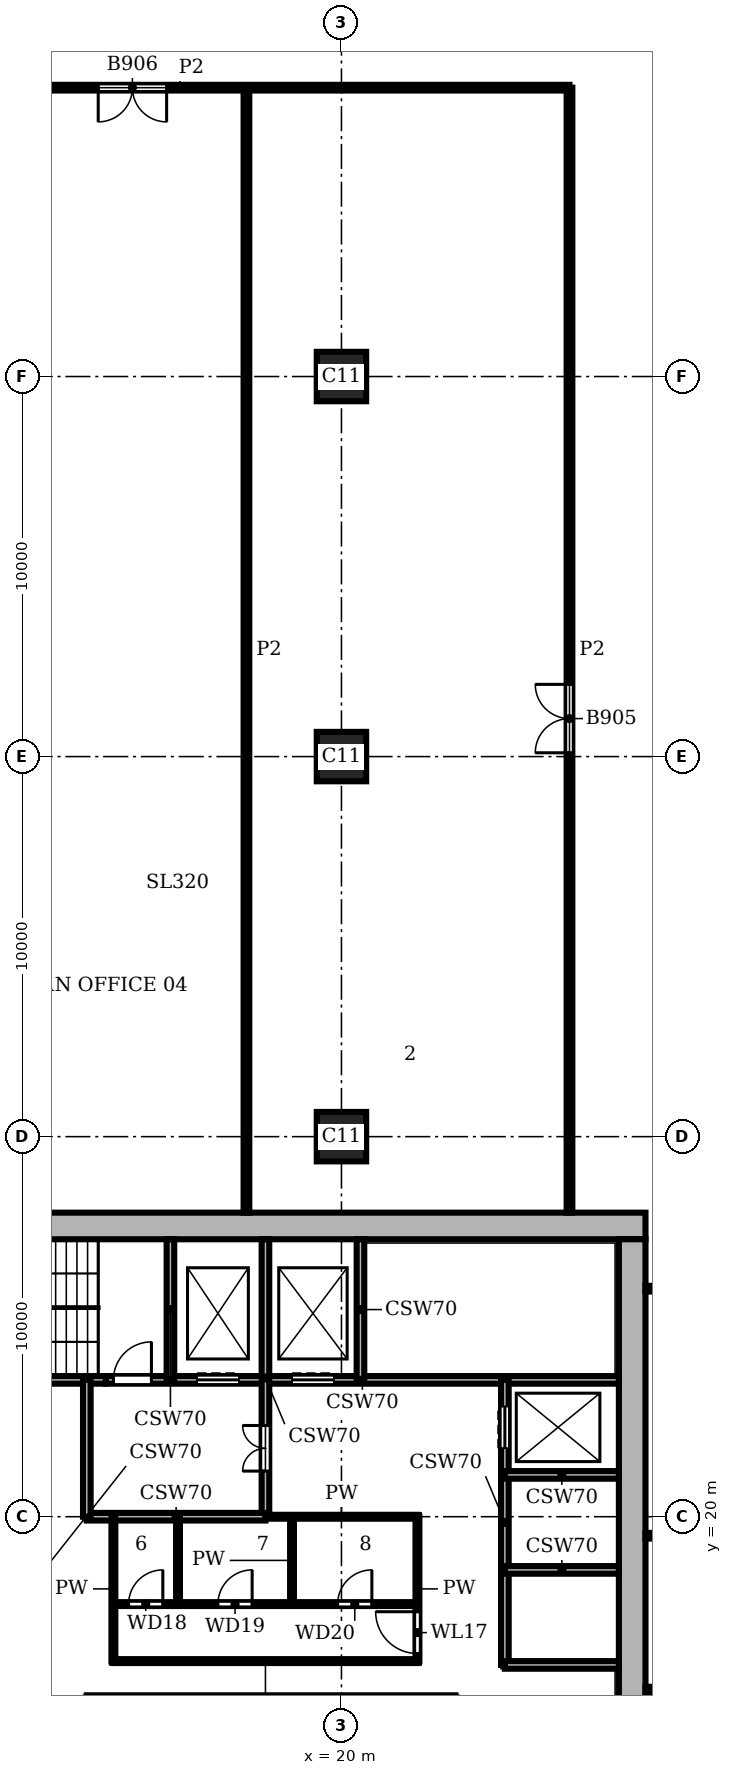
"""IFC4 building model, lengths in metres.
Left out: names, types, materials, properties, quantities, classifications, styles, units other than length and angle.
Written with IfcOpenShell. Run it as: python <this file> out.ifc"""

import sys

from ifc_helpers import new_model, si_unit, direction, frame, frame_2d, origin, origin_2d, place, context, subcontext, project, spatial, rectangle, extrude, element, fill, save


model = new_model("IFC4")
c1 = context("Model", 3, precision=1e-05, world=origin(), true_north=direction((0.0, 1.0)))
c2 = subcontext(c1, "Body", "Model", "MODEL_VIEW")
j1 = project(units=[si_unit("LENGTHUNIT", "METRE"), si_unit("PLANEANGLEUNIT", "RADIAN")], contexts=[c1])
p1 = place(None, origin())
s1 = spatial("IfcSite", under=j1, at=p1, CompositionType="ELEMENT")
p2 = place(p1, origin())
s2 = spatial("IfcBuilding", under=s1, at=p2, CompositionType="ELEMENT")
p3 = place(p2, frame((0.0, 0.0, 225.3)))
s3 = spatial("IfcBuildingStorey", under=s2, at=p3, CompositionType="ELEMENT", Elevation=225.3)
for number, where, z_axis, x_axis in (
    (1, (20.0, 30.0, 0.0), (0.0, 0.0, 1.0), (1.0, 0.0, 0.0)),
    (2, (20.0, 40.0, 0.0), (0.0, 0.0, 1.0), (1.0, 0.0, 0.0)),
    (3, (20.0, 50.0, 0.0), (0.0, 0.0, 1.0), (1.0, 0.0, 0.0)),
):
    element("IfcColumn", number, at=place(p3, frame(where, z_axis=z_axis, x_axis=x_axis)), inside=s3, PredefinedType="COLUMN", context=c2, shape_type="SweptSolid", body=[
        extrude(rectangle(XDim=1.3, YDim=1.3, at=origin_2d()), origin(), (0.0, 0.0, 1.0), 3.9),
    ])
p4 = place(p3, frame((27.65, 8.7, 0.0), z_axis=(0.0, 0.0, 1.0), x_axis=(0.0, 1.0, 0.0)))
e4 = element("IfcWall", 4, at=p4, inside=s3, PredefinedType="SHEAR", context=c2, shape_type="SweptSolid", body=[
    extrude(rectangle(XDim=18.6, YDim=0.7, at=frame_2d((9.3, 0.0))), origin(), (0.0, 0.0, 1.0), 3.9),
])
p5 = place(p4, frame((4.75, 0.0, 0.0)))
e5 = element("IfcOpeningElement", 5, at=p5, cuts=e4, PredefinedType="OPENING", context=c2, shape_type="SweptSolid", body=[
    extrude(rectangle(XDim=1.6, YDim=2.1, at=frame_2d((0.8, 1.05))), frame((0.0, 0.36, 0.0), z_axis=(0.0, -1.0, 0.0), x_axis=(1.0, 0.0, 0.0)), (0.0, 0.0, 1.0), 0.72),
])
p6 = place(p3, frame((28.0, 27.65, 0.0), z_axis=(0.0, 0.0, 1.0), x_axis=(-1.0, 0.0, 0.0)))
e6 = element("IfcWall", 6, at=p6, inside=s3, PredefinedType="SHEAR", context=c2, shape_type="SweptSolid", body=[
    extrude(rectangle(XDim=20.0, YDim=0.7, at=frame_2d((10.0, 0.0))), origin(), (0.0, 0.0, 1.0), 3.9),
])
p7 = place(p3, frame((24.3, 16.1, 0.0), z_axis=(0.0, 0.0, 1.0), x_axis=(1.0, 0.0, 0.0)))
e7 = element("IfcWall", 7, at=p7, inside=s3, PredefinedType="SHEAR", context=c2, shape_type="SweptSolid", body=[
    extrude(rectangle(XDim=3.0, YDim=0.2, at=frame_2d((1.5, 0.0))), origin(), (0.0, 0.0, 1.0), 3.58),
])
p8 = place(p3, frame((14.0, 16.2, 0.0), z_axis=(0.0, 0.0, 1.0), x_axis=(1.0, 0.0, 0.0)))
e8 = element("IfcWall", 8, at=p8, inside=s3, PredefinedType="PARTITIONING", context=c2, shape_type="SweptSolid", body=[
    extrude(rectangle(XDim=8.0, YDim=0.1, at=frame_2d((4.0, 0.0))), origin(), (0.0, 0.0, 1.0), 3.58),
])
p9 = place(p3, frame((14.0, 17.7, 0.0), z_axis=(0.0, 0.0, 1.0), x_axis=(1.0, 0.0, 0.0)))
e9 = element("IfcWall", 9, at=p9, inside=s3, PredefinedType="PARTITIONING", context=c2, shape_type="SweptSolid", body=[
    extrude(rectangle(XDim=8.0, YDim=0.1, at=frame_2d((4.0, 0.0))), origin(), (0.0, 0.0, 1.0), 3.58),
])
p10 = place(p9, frame((0.4, 0.0, 0.0)))
e10 = element("IfcOpeningElement", 10, at=p10, cuts=e9, PredefinedType="OPENING", context=c2, shape_type="SweptSolid", body=[
    extrude(rectangle(XDim=0.9, YDim=2.1, at=frame_2d((0.45, 1.05))), frame((0.0, 0.06, 0.0), z_axis=(0.0, -1.0, 0.0), x_axis=(1.0, 0.0, 0.0)), (0.0, 0.0, 1.0), 0.12),
])
p11 = place(p9, frame((2.75, 0.0, 0.0)))
e11 = element("IfcOpeningElement", 11, at=p11, cuts=e9, PredefinedType="OPENING", context=c2, shape_type="SweptSolid", body=[
    extrude(rectangle(XDim=0.9, YDim=2.1, at=frame_2d((0.45, 1.05))), frame((0.0, 0.06, 0.0), z_axis=(0.0, -1.0, 0.0), x_axis=(1.0, 0.0, 0.0)), (0.0, 0.0, 1.0), 0.12),
])
p12 = place(p9, frame((5.9, 0.0, 0.0)))
e12 = element("IfcOpeningElement", 12, at=p12, cuts=e9, PredefinedType="OPENING", context=c2, shape_type="SweptSolid", body=[
    extrude(rectangle(XDim=0.9, YDim=2.1, at=frame_2d((0.45, 1.05))), frame((0.0, 0.06, 0.0), z_axis=(0.0, -1.0, 0.0), x_axis=(1.0, 0.0, 0.0)), (0.0, 0.0, 1.0), 0.12),
])
p13 = place(p3, frame((24.3, 18.6, 0.0), z_axis=(0.0, 0.0, 1.0), x_axis=(1.0, 0.0, 0.0)))
e13 = element("IfcWall", 13, at=p13, inside=s3, PredefinedType="SHEAR", context=c2, shape_type="SweptSolid", body=[
    extrude(rectangle(XDim=3.0, YDim=0.2, at=frame_2d((1.5, 0.0))), origin(), (0.0, 0.0, 1.0), 3.58),
])
p14 = place(p3, frame((18.0, 20.0, 0.0), z_axis=(0.0, 0.0, 1.0), x_axis=(1.0, 0.0, 0.0)))
e14 = element("IfcWall", 14, at=p14, inside=s3, PredefinedType="PARTITIONING", context=c2, shape_type="SweptSolid", body=[
    extrude(rectangle(XDim=4.0, YDim=0.1, at=frame_2d((2.0, 0.0))), origin(), (0.0, 0.0, 1.0), 3.58),
])
p15 = place(p3, frame((13.3, 20.0, 0.0), z_axis=(0.0, 0.0, 1.0), x_axis=(1.0, 0.0, 0.0)))
e15 = element("IfcWall", 15, at=p15, inside=s3, PredefinedType="SHEAR", context=c2, shape_type="SweptSolid", body=[
    extrude(rectangle(XDim=4.7, YDim=0.2, at=frame_2d((2.35, 0.0))), origin(), (0.0, 0.0, 1.0), 3.58),
])
p16 = place(p3, frame((24.3, 21.1, 0.0), z_axis=(0.0, 0.0, 1.0), x_axis=(1.0, 0.0, 0.0)))
e16 = element("IfcWall", 16, at=p16, inside=s3, PredefinedType="SHEAR", context=c2, shape_type="SweptSolid", body=[
    extrude(rectangle(XDim=3.0, YDim=0.2, at=frame_2d((1.5, 0.0))), origin(), (0.0, 0.0, 1.0), 3.58),
])
p17 = place(p3, frame((8.7, 23.6, 0.0), z_axis=(0.0, 0.0, 1.0), x_axis=(1.0, 0.0, 0.0)))
e17 = element("IfcWall", 17, at=p17, inside=s3, PredefinedType="SHEAR", context=c2, shape_type="SweptSolid", body=[
    extrude(rectangle(XDim=5.1, YDim=0.2, at=frame_2d((2.55, 0.0))), origin(), (0.0, 0.0, 1.0), 3.58),
])
p18 = place(p3, frame((13.8, 23.6, 0.0), z_axis=(0.0, 0.0, 1.0), x_axis=(1.0, 0.0, 0.0)))
e18 = element("IfcWall", 18, at=p18, inside=s3, PredefinedType="SHEAR", context=c2, shape_type="SweptSolid", body=[
    extrude(rectangle(XDim=13.5, YDim=0.2, at=frame_2d((6.75, 0.0))), origin(), (0.0, 0.0, 1.0), 3.58),
])
p19 = place(p18, frame((2.4, 0.0, 0.0)))
e19 = element("IfcOpeningElement", 19, at=p19, cuts=e18, PredefinedType="OPENING", context=c2, shape_type="SweptSolid", body=[
    extrude(rectangle(XDim=1.1, YDim=2.1, at=frame_2d((0.55, 1.05))), frame((0.0, 0.11, 0.0), z_axis=(0.0, -1.0, 0.0), x_axis=(1.0, 0.0, 0.0)), (0.0, 0.0, 1.0), 0.22),
])
p20 = place(p18, frame((4.9, 0.0, 0.0)))
e20 = element("IfcOpeningElement", 20, at=p20, cuts=e18, PredefinedType="OPENING", context=c2, shape_type="SweptSolid", body=[
    extrude(rectangle(XDim=1.1, YDim=2.1, at=frame_2d((0.55, 1.05))), frame((0.0, 0.11, 0.0), z_axis=(0.0, -1.0, 0.0), x_axis=(1.0, 0.0, 0.0)), (0.0, 0.0, 1.0), 0.22),
])
p21 = place(p18, frame((0.2, 0.0, 0.0)))
e21 = element("IfcOpeningElement", 21, at=p21, cuts=e18, PredefinedType="OPENING", context=c2, shape_type="SweptSolid", body=[
    extrude(rectangle(XDim=1.0, YDim=2.1, at=frame_2d((0.5, 1.05))), frame((0.0, 0.11, 0.0), z_axis=(0.0, -1.0, 0.0), x_axis=(1.0, 0.0, 0.0)), (0.0, 0.0, 1.0), 0.22),
])
p22 = place(p3, frame((13.3, 20.0, 0.0), z_axis=(0.0, 0.0, 1.0), x_axis=(0.0, 1.0, 0.0)))
e22 = element("IfcWall", 22, at=p22, inside=s3, PredefinedType="SHEAR", context=c2, shape_type="SweptSolid", body=[
    extrude(rectangle(XDim=3.6, YDim=0.2, at=frame_2d((1.8, 0.0))), origin(), (0.0, 0.0, 1.0), 3.58),
])
p23 = place(p3, frame((14.0, 16.2, 0.0), z_axis=(0.0, 0.0, 1.0), x_axis=(0.0, 1.0, 0.0)))
e23 = element("IfcWall", 23, at=p23, inside=s3, PredefinedType="PARTITIONING", context=c2, shape_type="SweptSolid", body=[
    extrude(rectangle(XDim=3.8, YDim=0.1, at=frame_2d((1.9, 0.0))), origin(), (0.0, 0.0, 1.0), 3.58),
])
p24 = place(p3, frame((15.5, 23.6, 0.0), z_axis=(0.0, 0.0, 1.0), x_axis=(0.0, 1.0, 0.0)))
e24 = element("IfcWall", 24, at=p24, inside=s3, PredefinedType="SHEAR", context=c2, shape_type="SweptSolid", body=[
    extrude(rectangle(XDim=3.7, YDim=0.2, at=frame_2d((1.85, 0.0))), origin(), (0.0, 0.0, 1.0), 3.58),
])
p25 = place(p3, frame((15.7, 17.7, 0.0), z_axis=(0.0, 0.0, 1.0), x_axis=(0.0, 1.0, 0.0)))
e25 = element("IfcWall", 25, at=p25, inside=s3, PredefinedType="PARTITIONING", context=c2, shape_type="SweptSolid", body=[
    extrude(rectangle(XDim=2.3, YDim=0.1, at=frame_2d((1.15, 0.0))), origin(), (0.0, 0.0, 1.0), 3.58),
])
p26 = place(p3, frame((18.0, 20.0, 0.0), z_axis=(0.0, 0.0, 1.0), x_axis=(0.0, 1.0, 0.0)))
e26 = element("IfcWall", 26, at=p26, inside=s3, PredefinedType="SHEAR", context=c2, shape_type="SweptSolid", body=[
    extrude(rectangle(XDim=7.3, YDim=0.2, at=frame_2d((3.65, 0.0))), origin(), (0.0, 0.0, 1.0), 3.58),
])
p27 = place(p26, frame((1.2, 0.0, 0.0)))
e27 = element("IfcOpeningElement", 27, at=p27, cuts=e26, PredefinedType="OPENING", context=c2, shape_type="SweptSolid", body=[
    extrude(rectangle(XDim=1.2, YDim=2.1, at=frame_2d((0.6, 1.05))), frame((0.0, 0.11, 0.0), z_axis=(0.0, -1.0, 0.0), x_axis=(1.0, 0.0, 0.0)), (0.0, 0.0, 1.0), 0.22),
])
p28 = place(p3, frame((18.7, 17.7, 0.0), z_axis=(0.0, 0.0, 1.0), x_axis=(0.0, 1.0, 0.0)))
e28 = element("IfcWall", 28, at=p28, inside=s3, PredefinedType="PARTITIONING", context=c2, shape_type="SweptSolid", body=[
    extrude(rectangle(XDim=2.3, YDim=0.1, at=frame_2d((1.15, 0.0))), origin(), (0.0, 0.0, 1.0), 3.58),
])
p29 = place(p3, frame((20.5, 23.6, 0.0), z_axis=(0.0, 0.0, 1.0), x_axis=(0.0, 1.0, 0.0)))
e29 = element("IfcWall", 29, at=p29, inside=s3, PredefinedType="SHEAR", context=c2, shape_type="SweptSolid", body=[
    extrude(rectangle(XDim=3.7, YDim=0.2, at=frame_2d((1.85, 0.0))), origin(), (0.0, 0.0, 1.0), 3.58),
])
p30 = place(p3, frame((22.0, 16.2, 0.0), z_axis=(0.0, 0.0, 1.0), x_axis=(0.0, 1.0, 0.0)))
e30 = element("IfcWall", 30, at=p30, inside=s3, PredefinedType="PARTITIONING", context=c2, shape_type="SweptSolid", body=[
    extrude(rectangle(XDim=3.8, YDim=0.1, at=frame_2d((1.9, 0.0))), origin(), (0.0, 0.0, 1.0), 3.58),
])
p31 = place(p30, frame((0.2, 0.0, 0.0)))
e31 = element("IfcOpeningElement", 31, at=p31, cuts=e30, PredefinedType="OPENING", context=c2, shape_type="SweptSolid", body=[
    extrude(rectangle(XDim=1.1, YDim=2.1, at=frame_2d((0.55, 1.05))), frame((0.0, 0.06, 0.0), z_axis=(0.0, -1.0, 0.0), x_axis=(1.0, 0.0, 0.0)), (0.0, 0.0, 1.0), 0.12),
])
p32 = place(p3, frame((24.3, 16.1, 0.0), z_axis=(0.0, 0.0, 1.0), x_axis=(0.0, 1.0, 0.0)))
e32 = element("IfcWall", 32, at=p32, inside=s3, PredefinedType="SHEAR", context=c2, shape_type="SweptSolid", body=[
    extrude(rectangle(XDim=7.5, YDim=0.2, at=frame_2d((3.75, 0.0))), origin(), (0.0, 0.0, 1.0), 3.58),
])
p33 = place(p32, frame((5.7, 0.0, 0.0)))
e33 = element("IfcOpeningElement", 33, at=p33, cuts=e32, PredefinedType="OPENING", context=c2, shape_type="SweptSolid", body=[
    extrude(rectangle(XDim=1.1, YDim=2.1, at=frame_2d((0.55, 1.05))), frame((0.0, 0.11, 0.0), z_axis=(0.0, -1.0, 0.0), x_axis=(1.0, 0.0, 0.0)), (0.0, 0.0, 1.0), 0.22),
])
p34 = place(p3, frame((17.5, 28.0, 0.0), z_axis=(0.0, 0.0, 1.0), x_axis=(0.0, 1.0, 0.0)))
e34 = element("IfcWall", 34, at=p34, inside=s3, PredefinedType="PARTITIONING", context=c2, shape_type="SweptSolid", body=[
    extrude(rectangle(XDim=29.6, YDim=0.15, at=frame_2d((14.8, 0.0))), origin(), (0.0, 0.0, 1.0), 3.58),
])
p35 = place(p3, frame((26.0, 28.0, 0.0), z_axis=(0.0, 0.0, 1.0), x_axis=(0.0, 1.0, 0.0)))
e35 = element("IfcWall", 35, at=p35, inside=s3, PredefinedType="PARTITIONING", context=c2, shape_type="SweptSolid", body=[
    extrude(rectangle(XDim=29.6, YDim=0.15, at=frame_2d((14.8, 0.0))), origin(), (0.0, 0.0, 1.0), 3.58),
])
p36 = place(p35, frame((12.1, 0.0, 0.0)))
e36 = element("IfcOpeningElement", 36, at=p36, cuts=e35, PredefinedType="OPENING", context=c2, shape_type="SweptSolid", body=[
    extrude(rectangle(XDim=1.8, YDim=2.1, at=frame_2d((0.9, 1.05))), frame((0.0, 0.085, 0.0), z_axis=(0.0, -1.0, 0.0), x_axis=(1.0, 0.0, 0.0)), (0.0, 0.0, 1.0), 0.17),
])
p37 = place(p3, frame((28.0, 15.45, 0.0), z_axis=(0.0, 0.0, 1.0), x_axis=(1.0, 0.0, 0.0)))
e37 = element("IfcWall", 37, at=p37, inside=s3, PredefinedType="PARTITIONING", context=c2, shape_type="SweptSolid", body=[
    extrude(rectangle(XDim=2.8, YDim=0.15, at=frame_2d((1.4, 0.0))), origin(), (0.0, 0.0, 1.0), 3.58),
])
p38 = place(p3, frame((28.0, 19.5, 0.0), z_axis=(0.0, 0.0, 1.0), x_axis=(1.0, 0.0, 0.0)))
e38 = element("IfcWall", 38, at=p38, inside=s3, PredefinedType="PARTITIONING", context=c2, shape_type="SweptSolid", body=[
    extrude(rectangle(XDim=1.35, YDim=0.15, at=frame_2d((0.675, 0.0))), origin(), (0.0, 0.0, 1.0), 3.58),
])
p39 = place(p3, frame((28.0, 26.0, 0.0), z_axis=(0.0, 0.0, 1.0), x_axis=(1.0, 0.0, 0.0)))
e39 = element("IfcWall", 39, at=p39, inside=s3, PredefinedType="PARTITIONING", context=c2, shape_type="SweptSolid", body=[
    extrude(rectangle(XDim=2.8, YDim=0.15, at=frame_2d((1.4, 0.0))), origin(), (0.0, 0.0, 1.0), 3.58),
])
p40 = place(p3, frame((5.5, 57.6, 0.0), z_axis=(0.0, 0.0, 1.0), x_axis=(1.0, 0.0, 0.0)))
e40 = element("IfcWall", 40, at=p40, inside=s3, PredefinedType="PARTITIONING", context=c2, shape_type="SweptSolid", body=[
    extrude(rectangle(XDim=20.5, YDim=0.15, at=frame_2d((10.25, 0.0))), origin(), (0.0, 0.0, 1.0), 3.58),
])
p41 = place(p40, frame((8.1, 0.0, 0.0)))
e41 = element("IfcOpeningElement", 41, at=p41, cuts=e40, PredefinedType="OPENING", context=c2, shape_type="SweptSolid", body=[
    extrude(rectangle(XDim=1.8, YDim=2.1, at=frame_2d((0.9, 1.05))), frame((0.0, 0.085, 0.0), z_axis=(0.0, -1.0, 0.0), x_axis=(1.0, 0.0, 0.0)), (0.0, 0.0, 1.0), 0.17),
])
p42 = place(p33, origin())
e42 = element("IfcDoor", 42, at=p42, inside=s3, OperationType="DOUBLE_DOOR_SLIDING", PredefinedType="DOOR", context=c2, shape_type="SweptSolid", body=[
    extrude(rectangle(XDim=1.1, YDim=2.1, at=frame_2d((0.55, 1.05))), frame((0.0, 0.025, 0.0), z_axis=(0.0, -1.0, 0.0), x_axis=(1.0, 0.0, 0.0)), (0.0, 0.0, 1.0), 0.05),
])
fill(e33, e42)
p43 = place(p19, origin())
e43 = element("IfcDoor", 43, at=p43, inside=s3, OperationType="DOUBLE_DOOR_SLIDING", PredefinedType="DOOR", context=c2, shape_type="SweptSolid", body=[
    extrude(rectangle(XDim=1.1, YDim=2.1, at=frame_2d((0.55, 1.05))), frame((0.0, 0.025, 0.0), z_axis=(0.0, -1.0, 0.0), x_axis=(1.0, 0.0, 0.0)), (0.0, 0.0, 1.0), 0.05),
])
fill(e19, e43)
p44 = place(p20, origin())
e44 = element("IfcDoor", 44, at=p44, inside=s3, OperationType="DOUBLE_DOOR_SLIDING", PredefinedType="DOOR", context=c2, shape_type="SweptSolid", body=[
    extrude(rectangle(XDim=1.1, YDim=2.1, at=frame_2d((0.55, 1.05))), frame((0.0, 0.025, 0.0), z_axis=(0.0, -1.0, 0.0), x_axis=(1.0, 0.0, 0.0)), (0.0, 0.0, 1.0), 0.05),
])
fill(e20, e44)
p45 = place(p21, origin())
e45 = element("IfcDoor", 45, at=p45, inside=s3, OperationType="SINGLE_SWING_RIGHT", PredefinedType="DOOR", context=c2, shape_type="SweptSolid", body=[
    extrude(rectangle(XDim=1.0, YDim=2.1, at=frame_2d((0.5, 1.05))), frame((0.0, 0.025, 0.0), z_axis=(0.0, -1.0, 0.0), x_axis=(1.0, 0.0, 0.0)), (0.0, 0.0, 1.0), 0.05),
])
fill(e21, e45)
p46 = place(p27, origin())
e46 = element("IfcDoor", 46, at=p46, inside=s3, OperationType="DOUBLE_DOOR_SINGLE_SWING", PredefinedType="DOOR", context=c2, shape_type="SweptSolid", body=[
    extrude(rectangle(XDim=1.2, YDim=2.1, at=frame_2d((0.6, 1.05))), frame((0.0, 0.025, 0.0), z_axis=(0.0, -1.0, 0.0), x_axis=(1.0, 0.0, 0.0)), (0.0, 0.0, 1.0), 0.05),
])
fill(e27, e46)
p47 = place(p31, origin())
e47 = element("IfcDoor", 47, at=p47, inside=s3, OperationType="SINGLE_SWING_RIGHT", PredefinedType="DOOR", context=c2, shape_type="SweptSolid", body=[
    extrude(rectangle(XDim=1.1, YDim=2.1, at=frame_2d((0.55, 1.05))), frame((0.0, 0.025, 0.0), z_axis=(0.0, -1.0, 0.0), x_axis=(1.0, 0.0, 0.0)), (0.0, 0.0, 1.0), 0.05),
])
fill(e31, e47)
p48 = place(p10, origin())
e48 = element("IfcDoor", 48, at=p48, inside=s3, OperationType="SINGLE_SWING_RIGHT", PredefinedType="DOOR", context=c2, shape_type="SweptSolid", body=[
    extrude(rectangle(XDim=0.9, YDim=2.1, at=frame_2d((0.45, 1.05))), frame((0.0, 0.025, 0.0), z_axis=(0.0, -1.0, 0.0), x_axis=(1.0, 0.0, 0.0)), (0.0, 0.0, 1.0), 0.05),
])
fill(e10, e48)
p49 = place(p11, origin())
e49 = element("IfcDoor", 49, at=p49, inside=s3, OperationType="SINGLE_SWING_RIGHT", PredefinedType="DOOR", context=c2, shape_type="SweptSolid", body=[
    extrude(rectangle(XDim=0.9, YDim=2.1, at=frame_2d((0.45, 1.05))), frame((0.0, 0.025, 0.0), z_axis=(0.0, -1.0, 0.0), x_axis=(1.0, 0.0, 0.0)), (0.0, 0.0, 1.0), 0.05),
])
fill(e11, e49)
p50 = place(p12, origin())
e50 = element("IfcDoor", 50, at=p50, inside=s3, OperationType="SINGLE_SWING_RIGHT", PredefinedType="DOOR", context=c2, shape_type="SweptSolid", body=[
    extrude(rectangle(XDim=0.9, YDim=2.1, at=frame_2d((0.45, 1.05))), frame((0.0, 0.025, 0.0), z_axis=(0.0, -1.0, 0.0), x_axis=(1.0, 0.0, 0.0)), (0.0, 0.0, 1.0), 0.05),
])
fill(e12, e50)
p51 = place(p36, origin())
e51 = element("IfcDoor", 51, at=p51, inside=s3, OperationType="DOUBLE_DOOR_SINGLE_SWING", PredefinedType="DOOR", context=c2, shape_type="SweptSolid", body=[
    extrude(rectangle(XDim=1.8, YDim=2.1, at=frame_2d((0.9, 1.05))), frame((0.0, 0.025, 0.0), z_axis=(0.0, -1.0, 0.0), x_axis=(1.0, 0.0, 0.0)), (0.0, 0.0, 1.0), 0.05),
])
fill(e36, e51)
p52 = place(p41, frame((1.8, 0.0, 0.0), z_axis=(0.0, 0.0, 1.0), x_axis=(-1.0, 0.0, 0.0)))
e52 = element("IfcDoor", 52, at=p52, inside=s3, OperationType="DOUBLE_DOOR_SINGLE_SWING", PredefinedType="DOOR", context=c2, shape_type="SweptSolid", body=[
    extrude(rectangle(XDim=1.8, YDim=2.1, at=frame_2d((0.9, 1.05))), frame((0.0, 0.025, 0.0), z_axis=(0.0, -1.0, 0.0), x_axis=(1.0, 0.0, 0.0)), (0.0, 0.0, 1.0), 0.05),
])
fill(e41, e52)
save(model, sys.argv[1])
